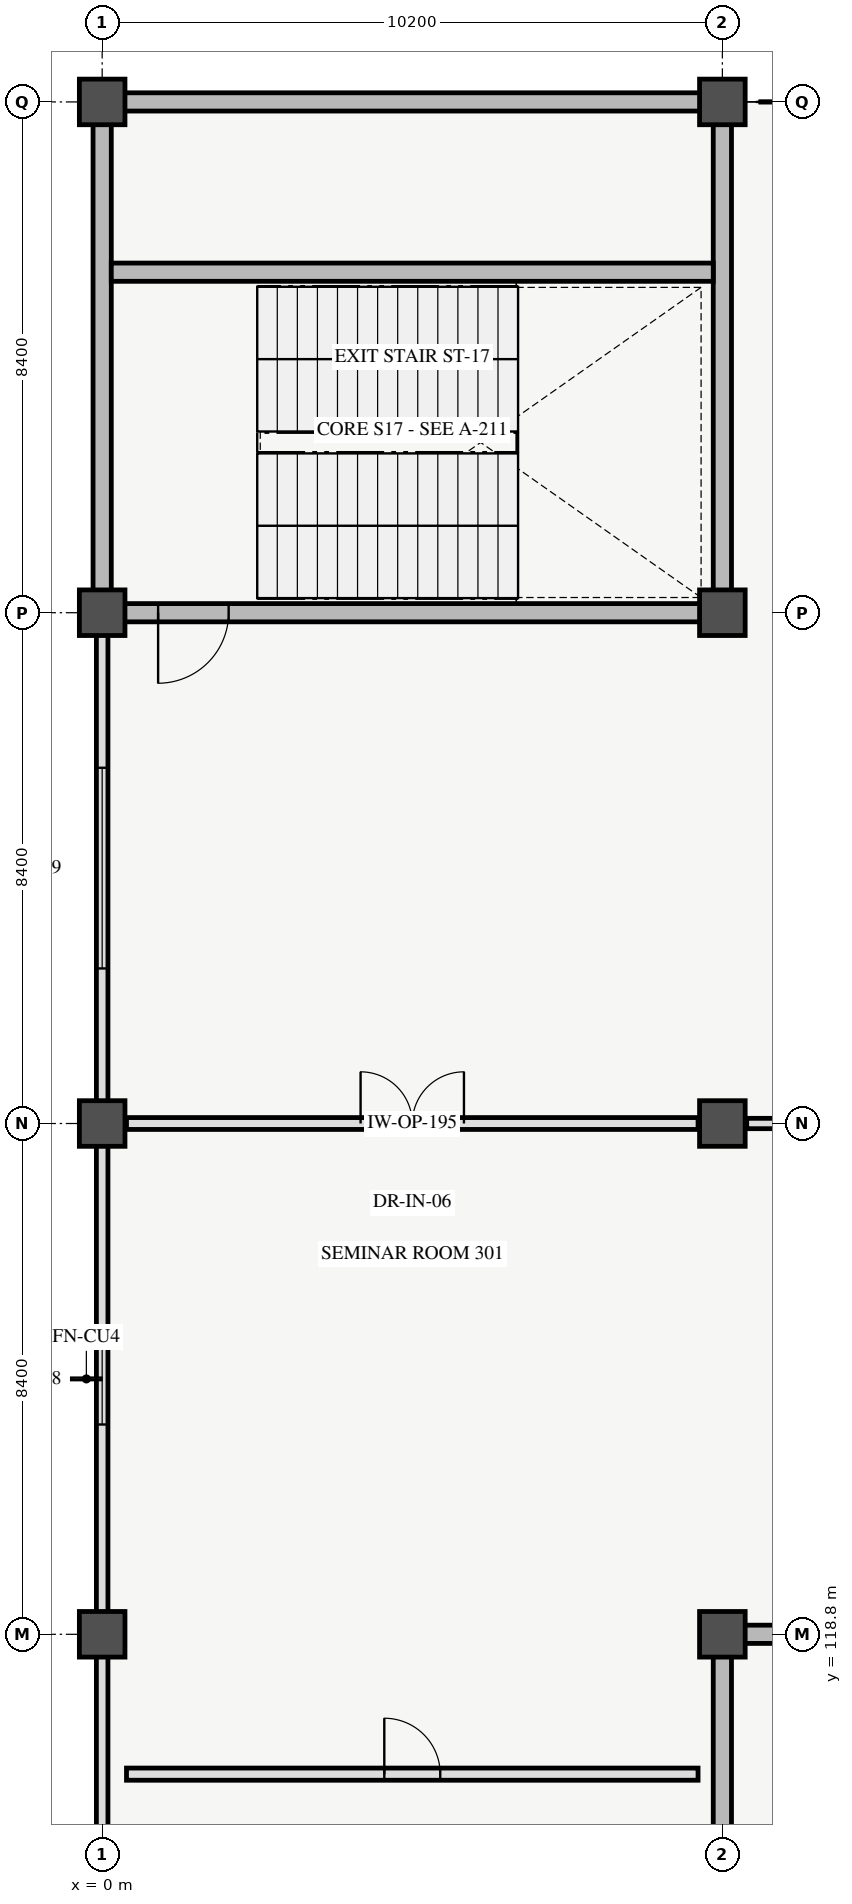
"""IFC4 building model, lengths in metres.
Left out: names, types, materials, properties, quantities, classifications, styles, units other than length and angle.
Written with IfcOpenShell. Run it as: python <this file> out.ifc"""

import sys

from ifc_helpers import new_model, si_unit, direction, frame, frame_2d, origin, origin_2d, place, context, subcontext, project, spatial, rectangle, extrude, element, fill, save


model = new_model("IFC4")
c1 = context("Model", 3, precision=1e-05, world=origin(), true_north=direction((0.0, 1.0)))
c2 = subcontext(c1, "Body", "Model", "MODEL_VIEW")
j1 = project(units=[si_unit("LENGTHUNIT", "METRE"), si_unit("PLANEANGLEUNIT", "RADIAN")], contexts=[c1])
p1 = place(None, origin())
s1 = spatial("IfcSite", under=j1, at=p1, CompositionType="ELEMENT")
p2 = place(p1, origin())
s2 = spatial("IfcBuilding", under=s1, at=p2, CompositionType="ELEMENT")
p3 = place(p2, frame((0.0, 0.0, 10.8)))
s3 = spatial("IfcBuildingStorey", under=s2, at=p3, CompositionType="ELEMENT", Elevation=10.8)
for number, where, z_axis, x_axis in (
    (1, (0.0, 118.8, 0.0), (0.0, 0.0, 1.0), (1.0, 0.0, 0.0)),
    (2, (0.0, 127.2, 0.0), (0.0, 0.0, 1.0), (1.0, 0.0, 0.0)),
    (3, (0.0, 135.6, 0.0), (0.0, 0.0, 1.0), (1.0, 0.0, 0.0)),
    (4, (0.0, 144.0, 0.0), (0.0, 0.0, 1.0), (1.0, 0.0, 0.0)),
    (5, (10.2, 118.8, 0.0), (0.0, 0.0, 1.0), (1.0, 0.0, 0.0)),
    (6, (10.2, 127.2, 0.0), (0.0, 0.0, 1.0), (1.0, 0.0, 0.0)),
    (7, (10.2, 135.6, 0.0), (0.0, 0.0, 1.0), (1.0, 0.0, 0.0)),
    (8, (10.2, 144.0, 0.0), (0.0, 0.0, 1.0), (1.0, 0.0, 0.0)),
):
    element("IfcColumn", number, at=place(p3, frame(where, z_axis=z_axis, x_axis=x_axis)), inside=s3, PredefinedType="COLUMN", context=c2, shape_type="SweptSolid", body=[
        extrude(rectangle(XDim=0.75, YDim=0.75, at=origin_2d()), origin(), (0.0, 0.0, 1.0), 4.2),
    ])
p4 = place(p3, frame((10.2, 118.8, 0.0), z_axis=(0.0, 0.0, 1.0), x_axis=(1.0, 0.0, 0.0)))
e9 = element("IfcWall", 9, at=p4, inside=s3, PredefinedType="SHEAR", context=c2, shape_type="SweptSolid", body=[
    extrude(rectangle(XDim=10.2, YDim=0.3, at=frame_2d((5.1, 0.0))), origin(), (0.0, 0.0, 1.0), 4.2),
])
p5 = place(p4, frame((1.2, 0.0, 0.0)))
e10 = element("IfcOpeningElement", 10, at=p5, cuts=e9, PredefinedType="OPENING", context=c2, shape_type="SweptSolid", body=[
    extrude(rectangle(XDim=1.16, YDim=2.2, at=frame_2d((0.58, 1.1))), frame((0.0, 0.16, 0.0), z_axis=(0.0, -1.0, 0.0), x_axis=(1.0, 0.0, 0.0)), (0.0, 0.0, 1.0), 0.32),
])
p6 = place(p4, frame((7.4, 0.0, 0.0)))
e11 = element("IfcOpeningElement", 11, at=p6, cuts=e9, PredefinedType="OPENING", context=c2, shape_type="SweptSolid", body=[
    extrude(rectangle(XDim=1.1, YDim=2.2, at=frame_2d((0.55, 1.1))), frame((0.0, 0.16, 0.0), z_axis=(0.0, -1.0, 0.0), x_axis=(1.0, 0.0, 0.0)), (0.0, 0.0, 1.0), 0.32),
])
p7 = place(p3, frame((10.2, 109.2, 0.0), z_axis=(0.0, 0.0, 1.0), x_axis=(0.0, 1.0, 0.0)))
e12 = element("IfcWall", 12, at=p7, inside=s3, PredefinedType="SHEAR", context=c2, shape_type="SweptSolid", body=[
    extrude(rectangle(XDim=9.6, YDim=0.3, at=frame_2d((4.8, 0.0))), origin(), (0.0, 0.0, 1.0), 4.2),
])
p8 = place(p3, frame((0.0, 109.44, 0.0), z_axis=(0.0, 0.0, 1.0), x_axis=(0.0, 1.0, 0.0)))
e13 = element("IfcWall", 13, at=p8, inside=s3, PredefinedType="STANDARD", context=c2, shape_type="SweptSolid", body=[
    extrude(rectangle(XDim=9.12, YDim=0.19, at=frame_2d((4.56, 0.0))), origin(), (0.0, 0.0, 1.0), 3.06),
])
p9 = place(p8, frame((3.21, 0.0, 0.9)))
e14 = element("IfcOpeningElement", 14, at=p9, cuts=e13, PredefinedType="OPENING", context=c2, shape_type="SweptSolid", body=[
    extrude(rectangle(XDim=2.7, YDim=1.85, at=frame_2d((1.35, 0.925))), frame((0.0, 0.105, 0.0), z_axis=(0.0, -1.0, 0.0), x_axis=(1.0, 0.0, 0.0)), (0.0, 0.0, 1.0), 0.21),
])
p10 = place(p3, frame((0.0, 119.04, 0.0), z_axis=(0.0, 0.0, 1.0), x_axis=(0.0, 1.0, 0.0)))
e15 = element("IfcWall", 15, at=p10, inside=s3, PredefinedType="STANDARD", context=c2, shape_type="SweptSolid", body=[
    extrude(rectangle(XDim=7.92, YDim=0.19, at=frame_2d((3.96, 0.0))), origin(), (0.0, 0.0, 1.0), 3.06),
])
p11 = place(p10, frame((3.21, 0.0, 0.9)))
e16 = element("IfcOpeningElement", 16, at=p11, cuts=e15, PredefinedType="OPENING", context=c2, shape_type="SweptSolid", body=[
    extrude(rectangle(XDim=1.5, YDim=1.8, at=frame_2d((0.75, 0.9))), frame((0.0, 0.105, 0.0), z_axis=(0.0, -1.0, 0.0), x_axis=(1.0, 0.0, 0.0)), (0.0, 0.0, 1.0), 0.21),
])
p12 = place(p3, frame((0.0, 127.44, 0.0), z_axis=(0.0, 0.0, 1.0), x_axis=(0.0, 1.0, 0.0)))
e17 = element("IfcWall", 17, at=p12, inside=s3, PredefinedType="STANDARD", context=c2, shape_type="SweptSolid", body=[
    extrude(rectangle(XDim=7.92, YDim=0.19, at=frame_2d((3.96, 0.0))), origin(), (0.0, 0.0, 1.0), 3.06),
])
p13 = place(p12, frame((2.31, 0.0, 0.9)))
e18 = element("IfcOpeningElement", 18, at=p13, cuts=e17, PredefinedType="OPENING", context=c2, shape_type="SweptSolid", body=[
    extrude(rectangle(XDim=3.3, YDim=1.95, at=frame_2d((1.65, 0.975))), frame((0.0, 0.105, 0.0), z_axis=(0.0, -1.0, 0.0), x_axis=(1.0, 0.0, 0.0)), (0.0, 0.0, 1.0), 0.21),
])
p14 = place(p3, frame((0.0, 135.6, 0.0), z_axis=(0.0, 0.0, 1.0), x_axis=(1.0, 0.0, 0.0)))
e19 = element("IfcWall", 19, at=p14, inside=s3, PredefinedType="SHEAR", context=c2, shape_type="SweptSolid", body=[
    extrude(rectangle(XDim=10.2, YDim=0.3, at=frame_2d((5.1, 0.0))), origin(), (0.0, 0.0, 1.0), 4.2),
])
p15 = place(p14, frame((0.92, 0.0, 0.0)))
e20 = element("IfcOpeningElement", 20, at=p15, cuts=e19, PredefinedType="OPENING", context=c2, shape_type="SweptSolid", body=[
    extrude(rectangle(XDim=1.16, YDim=2.2, at=frame_2d((0.58, 1.1))), frame((0.0, 0.16, 0.0), z_axis=(0.0, -1.0, 0.0), x_axis=(1.0, 0.0, 0.0)), (0.0, 0.0, 1.0), 0.32),
])
p16 = place(p3, frame((0.0, 144.0, 0.0), z_axis=(0.0, 0.0, 1.0), x_axis=(1.0, 0.0, 0.0)))
e21 = element("IfcWall", 21, at=p16, inside=s3, PredefinedType="SHEAR", context=c2, shape_type="SweptSolid", body=[
    extrude(rectangle(XDim=10.2, YDim=0.3, at=frame_2d((5.1, 0.0))), origin(), (0.0, 0.0, 1.0), 4.2),
])
for number, where, z_axis, x_axis in (
    (22, (0.0, 135.6, 0.0), (0.0, 0.0, 1.0), (0.0, 1.0, 0.0)),
    (23, (10.2, 135.6, 0.0), (0.0, 0.0, 1.0), (0.0, 1.0, 0.0)),
):
    element("IfcWall", number, at=place(p3, frame(where, z_axis=z_axis, x_axis=x_axis)), inside=s3, PredefinedType="SHEAR", context=c2, shape_type="SweptSolid", body=[
        extrude(rectangle(XDim=8.4, YDim=0.3, at=frame_2d((4.2, 0.0))), origin(), (0.0, 0.0, 1.0), 4.2),
    ])
p17 = place(p3, frame((0.15, 141.2, 0.0), z_axis=(0.0, 0.0, 1.0), x_axis=(1.0, 0.0, 0.0)))
e24 = element("IfcWall", 24, at=p17, inside=s3, PredefinedType="SHEAR", context=c2, shape_type="SweptSolid", body=[
    extrude(rectangle(XDim=9.9, YDim=0.3, at=frame_2d((4.95, 0.0))), origin(), (0.0, 0.0, 1.0), 4.2),
])
p18 = place(p3, frame((0.4, 127.2, 0.0), z_axis=(0.0, 0.0, 1.0), x_axis=(1.0, 0.0, 0.0)))
e25 = element("IfcWall", 25, at=p18, inside=s3, PredefinedType="MOVABLE", context=c2, shape_type="SweptSolid", body=[
    extrude(rectangle(XDim=9.4, YDim=0.195, at=frame_2d((4.7, 0.0))), origin(), (0.0, 0.0, 1.0), 3.06),
])
p19 = place(p18, frame((3.85, 0.0, 0.0)))
e26 = element("IfcOpeningElement", 26, at=p19, cuts=e25, PredefinedType="OPENING", context=c2, shape_type="SweptSolid", body=[
    extrude(rectangle(XDim=1.7, YDim=2.3, at=frame_2d((0.85, 1.15))), frame((0.0, 0.107, 0.0), z_axis=(0.0, -1.0, 0.0), x_axis=(1.0, 0.0, 0.0)), (0.0, 0.0, 1.0), 0.215),
])
p20 = place(p3, frame((10.6, 127.2, 0.0), z_axis=(0.0, 0.0, 1.0), x_axis=(1.0, 0.0, 0.0)))
e27 = element("IfcWall", 27, at=p20, inside=s3, PredefinedType="MOVABLE", context=c2, shape_type="SweptSolid", body=[
    extrude(rectangle(XDim=9.4, YDim=0.17, at=frame_2d((4.7, 0.0))), origin(), (0.0, 0.0, 1.0), 3.06),
])
p21 = place(p20, frame((3.6, 0.0, 0.0)))
e28 = element("IfcOpeningElement", 28, at=p21, cuts=e27, PredefinedType="OPENING", context=c2, shape_type="SweptSolid", body=[
    extrude(rectangle(XDim=2.2, YDim=2.35, at=frame_2d((1.1, 1.175))), frame((0.0, 0.095, 0.0), z_axis=(0.0, -1.0, 0.0), x_axis=(1.0, 0.0, 0.0)), (0.0, 0.0, 1.0), 0.19),
])
p22 = place(p3, frame((0.4, 116.5, 0.0), z_axis=(0.0, 0.0, 1.0), x_axis=(1.0, 0.0, 0.0)))
e29 = element("IfcWall", 29, at=p22, inside=s3, PredefinedType="PARTITIONING", context=c2, shape_type="SweptSolid", body=[
    extrude(rectangle(XDim=9.4, YDim=0.2, at=frame_2d((4.7, 0.0))), origin(), (0.0, 0.0, 1.0), 3.06),
])
p23 = place(p22, frame((4.24, 0.0, 0.0)))
e30 = element("IfcOpeningElement", 30, at=p23, cuts=e29, PredefinedType="OPENING", context=c2, shape_type="SweptSolid", body=[
    extrude(rectangle(XDim=0.92, YDim=2.1, at=frame_2d((0.46, 1.05))), frame((0.0, 0.11, 0.0), z_axis=(0.0, -1.0, 0.0), x_axis=(1.0, 0.0, 0.0)), (0.0, 0.0, 1.0), 0.22),
])
p24 = place(p11, origin())
e31 = element("IfcWindow", 31, at=p24, inside=s3, PartitioningType="SINGLE_PANEL", PredefinedType="WINDOW", context=c2, shape_type="SweptSolid", body=[
    extrude(rectangle(XDim=1.5, YDim=1.8, at=frame_2d((0.75, 0.9))), frame((0.0, 0.03, 0.0), z_axis=(0.0, -1.0, 0.0), x_axis=(1.0, 0.0, 0.0)), (0.0, 0.0, 1.0), 0.06),
])
fill(e16, e31)
p25 = place(p13, origin())
e32 = element("IfcWindow", 32, at=p25, inside=s3, PartitioningType="TRIPLE_PANEL_VERTICAL", PredefinedType="WINDOW", context=c2, shape_type="SweptSolid", body=[
    extrude(rectangle(XDim=3.3, YDim=1.95, at=frame_2d((1.65, 0.975))), frame((0.0, 0.03, 0.0), z_axis=(0.0, -1.0, 0.0), x_axis=(1.0, 0.0, 0.0)), (0.0, 0.0, 1.0), 0.06),
])
fill(e18, e32)
p26 = place(p15, origin())
e33 = element("IfcDoor", 33, at=p26, inside=s3, OperationType="SINGLE_SWING_LEFT", PredefinedType="DOOR", context=c2, shape_type="SweptSolid", body=[
    extrude(rectangle(XDim=1.16, YDim=2.2, at=frame_2d((0.58, 1.1))), frame((0.0, 0.025, 0.0), z_axis=(0.0, -1.0, 0.0), x_axis=(1.0, 0.0, 0.0)), (0.0, 0.0, 1.0), 0.05),
])
fill(e20, e33)
p27 = place(p19, origin())
e34 = element("IfcDoor", 34, at=p27, inside=s3, OperationType="DOUBLE_DOOR_SINGLE_SWING", PredefinedType="DOOR", context=c2, shape_type="SweptSolid", body=[
    extrude(rectangle(XDim=1.7, YDim=2.3, at=frame_2d((0.85, 1.15))), frame((0.0, 0.025, 0.0), z_axis=(0.0, -1.0, 0.0), x_axis=(1.0, 0.0, 0.0)), (0.0, 0.0, 1.0), 0.05),
])
fill(e26, e34)
p28 = place(p23, origin())
e35 = element("IfcDoor", 35, at=p28, inside=s3, OperationType="SINGLE_SWING_LEFT", PredefinedType="DOOR", context=c2, shape_type="SweptSolid", body=[
    extrude(rectangle(XDim=0.92, YDim=2.1, at=frame_2d((0.46, 1.05))), frame((0.0, 0.025, 0.0), z_axis=(0.0, -1.0, 0.0), x_axis=(1.0, 0.0, 0.0)), (0.0, 0.0, 1.0), 0.05),
])
fill(e30, e35)
save(model, sys.argv[1])
